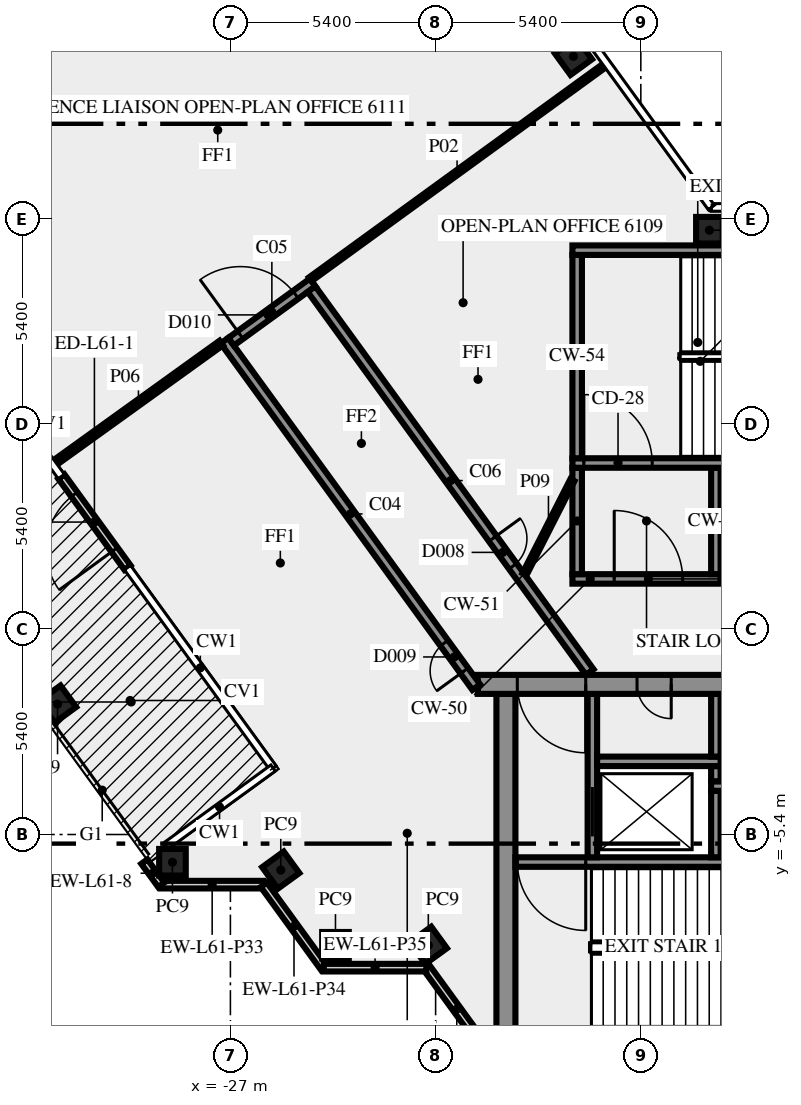
"""IFC4 building model, lengths in metres.
Left out: names, types, materials, properties, quantities, classifications, styles, units other than length and angle.
Written with IfcOpenShell. Run it as: python <this file> out.ifc"""

import sys

from ifc_helpers import new_model, si_unit, direction, frame, frame_2d, origin, origin_2d, place, context, subcontext, project, spatial, rectangle, extrude, element, fill, save


model = new_model("IFC4")
c1 = context("Model", 3, precision=1e-05, world=origin(), true_north=direction((0.0, 1.0)))
c2 = subcontext(c1, "Body", "Model", "MODEL_VIEW")
j1 = project(units=[si_unit("LENGTHUNIT", "METRE"), si_unit("PLANEANGLEUNIT", "RADIAN")], contexts=[c1])
p1 = place(None, origin())
s1 = spatial("IfcSite", under=j1, at=p1, CompositionType="ELEMENT")
p2 = place(p1, origin())
s2 = spatial("IfcBuilding", under=s1, at=p2, CompositionType="ELEMENT")
p3 = place(p2, frame((0.0, 0.0, 261.0)))
s3 = spatial("IfcBuildingStorey", under=s2, at=p3, CompositionType="ELEMENT", Elevation=261.0)
for number, where, z_axis, x_axis in (
    (1, (-17.974, 15.075, 0.0), (0.0, 0.0, 1.0), (-0.588, 0.809, 0.0)),
    (2, (-31.548, -1.969, 0.0), (0.0, 0.0, 1.0), (0.588, -0.809, 0.0)),
    (3, (-28.525, -6.13, 0.0), (0.0, 0.0, 1.0), (1.0, 0.0, 0.0)),
    (4, (-25.674, -6.337, 0.0), (0.0, 0.0, 1.0), (0.588, -0.809, 0.0)),
    (5, (-24.235, -8.315, 0.0), (0.0, 0.0, 1.0), (1.0, 0.0, 0.0)),
    (6, (-21.792, -8.315, 0.0), (0.0, 0.0, 1.0), (0.588, -0.809, 0.0)),
    (7, (-14.395, 10.5, 0.0), (0.0, 0.0, 1.0), (-1.0, 0.0, 0.0)),
):
    element("IfcColumn", number, at=place(p3, frame(where, z_axis=z_axis, x_axis=x_axis)), inside=s3, PredefinedType="COLUMN", context=c2, shape_type="SweptSolid", body=[
        extrude(rectangle(XDim=0.7, YDim=0.7, at=origin_2d()), origin(), (0.0, 0.0, 1.0), 3.65),
    ])
p4 = place(p3, frame((-21.833, -8.909, 0.0), z_axis=(0.0, 0.0, 1.0), x_axis=(0.587766567315, -0.809030569476, 0.0)))
e8 = element("IfcWall", 8, at=p4, inside=s3, PredefinedType="SOLIDWALL", context=c2, shape_type="SweptSolid", body=[
    extrude(rectangle(XDim=2.688, YDim=0.2, at=frame_2d((1.344, 0.0))), origin(), (0.0, 0.0, 1.0), 3.65),
])
p5 = place(p3, frame((-28.83, -6.719, 0.0), z_axis=(0.0, 0.0, 1.0), x_axis=(1.0, 0.0, 0.0)))
e9 = element("IfcWall", 9, at=p5, inside=s3, PredefinedType="SOLIDWALL", context=c2, shape_type="SweptSolid", body=[
    extrude(rectangle(XDim=2.7, YDim=0.2, at=frame_2d((1.35, 0.0))), origin(), (0.0, 0.0, 1.0), 3.65),
])
p6 = place(p3, frame((-26.12, -6.724, 0.0), z_axis=(0.0, 0.0, 1.0), x_axis=(0.587720002413, -0.809064397168, 0.0)))
e10 = element("IfcWall", 10, at=p6, inside=s3, PredefinedType="SOLIDWALL", context=c2, shape_type="SweptSolid", body=[
    extrude(rectangle(XDim=2.7, YDim=0.2, at=frame_2d((1.35, 0.0))), origin(), (0.0, 0.0, 1.0), 3.65),
])
p7 = place(p3, frame((-24.543, -8.904, 0.0), z_axis=(0.0, 0.0, 1.0), x_axis=(1.0, 0.0, 0.0)))
e11 = element("IfcWall", 11, at=p7, inside=s3, PredefinedType="SOLIDWALL", context=c2, shape_type="SweptSolid", body=[
    extrude(rectangle(XDim=2.7, YDim=0.2, at=frame_2d((1.35, 0.0))), origin(), (0.0, 0.0, 1.0), 3.65),
])
p8 = place(p3, frame((-29.708, 1.622, 0.0), z_axis=(0.0, 0.0, 1.0), x_axis=(-0.58782869016, 0.808985433135, 0.0)))
e12 = element("IfcWall", 12, at=p8, inside=s3, PredefinedType="SOLIDWALL", context=c2, shape_type="SweptSolid", body=[
    extrude(rectangle(XDim=2.963, YDim=0.2, at=frame_2d((1.481, 0.0))), origin(), (0.0, 0.0, 1.0), 3.65),
])
p9 = place(p8, frame((0.582, 0.0, 0.0)))
e13 = element("IfcOpeningElement", 13, at=p9, cuts=e12, PredefinedType="OPENING", context=c2, shape_type="SweptSolid", body=[
    extrude(rectangle(XDim=1.8, YDim=2.4, at=frame_2d((0.9, 1.2))), frame((0.0, 0.11, 0.0), z_axis=(0.0, -1.0, 0.0), x_axis=(1.0, 0.0, 0.0)), (0.0, 0.0, 1.0), 0.22),
])
p10 = place(p3, frame((-29.264, -6.113, 0.0), z_axis=(0.0, 0.0, 1.0), x_axis=(0.587941177097, -0.808903685412, 0.0)))
e14 = element("IfcWall", 14, at=p10, inside=s3, PredefinedType="SOLIDWALL", context=c2, shape_type="SweptSolid", body=[
    extrude(rectangle(XDim=0.756, YDim=0.2, at=frame_2d((0.378, 0.0))), origin(), (0.0, 0.0, 1.0), 3.65),
])
p11 = place(p3, frame((-19.75, -10.5, 0.0), z_axis=(0.0, 0.0, 1.0), x_axis=(0.0, 1.0, 0.0)))
e15 = element("IfcWall", 15, at=p11, inside=s3, PredefinedType="SHEAR", context=c2, shape_type="SweptSolid", body=[
    extrude(rectangle(XDim=8.8, YDim=0.5, at=frame_2d((4.4, 0.0))), origin(), (0.0, 0.0, 1.0), 3.65),
])
p12 = place(p3, frame((-11.45, -6.125, 0.0), z_axis=(0.0, 0.0, 1.0), x_axis=(-1.0, 0.0, 0.0)))
e16 = element("IfcWall", 16, at=p12, inside=s3, PredefinedType="SHEAR", context=c2, shape_type="SweptSolid", body=[
    extrude(rectangle(XDim=8.05, YDim=0.25, at=frame_2d((4.025, 0.0))), origin(), (0.0, 0.0, 1.0), 3.65),
])
p13 = place(p12, frame((6.2, 0.0, 0.0)))
e17 = element("IfcOpeningElement", 17, at=p13, cuts=e16, PredefinedType="OPENING", context=c2, shape_type="SweptSolid", body=[
    extrude(rectangle(XDim=1.8, YDim=2.1, at=frame_2d((0.9, 1.05))), frame((0.0, 0.135, 0.0), z_axis=(0.0, -1.0, 0.0), x_axis=(1.0, 0.0, 0.0)), (0.0, 0.0, 1.0), 0.27),
])
p14 = place(p3, frame((-17.475, -6.0, 0.0), z_axis=(0.0, 0.0, 1.0), x_axis=(0.0, 1.0, 0.0)))
e18 = element("IfcWall", 18, at=p14, inside=s3, PredefinedType="SHEAR", context=c2, shape_type="SweptSolid", body=[
    extrude(rectangle(XDim=4.3, YDim=0.25, at=frame_2d((2.15, 0.0))), origin(), (0.0, 0.0, 1.0), 3.65),
])
p15 = place(p14, frame((0.55, 0.0, 0.0)))
e19 = element("IfcOpeningElement", 19, at=p15, cuts=e18, PredefinedType="OPENING", context=c2, shape_type="SweptSolid", body=[
    extrude(rectangle(XDim=1.3, YDim=2.1, at=frame_2d((0.65, 1.05))), frame((0.0, 0.135, 0.0), z_axis=(0.0, -1.0, 0.0), x_axis=(1.0, 0.0, 0.0)), (0.0, 0.0, 1.0), 0.27),
])
p16 = place(p3, frame((-14.225, -6.0, 0.0), z_axis=(0.0, 0.0, 1.0), x_axis=(0.0, 1.0, 0.0)))
e20 = element("IfcWall", 20, at=p16, inside=s3, PredefinedType="SHEAR", context=c2, shape_type="SweptSolid", body=[
    extrude(rectangle(XDim=1.75, YDim=0.25, at=frame_2d((0.875, 0.0))), origin(), (0.0, 0.0, 1.0), 3.65),
])
p17 = place(p3, frame((-14.35, -4.125, 0.0), z_axis=(0.0, 0.0, 1.0), x_axis=(1.0, 0.0, 0.0)))
e21 = element("IfcWall", 21, at=p17, inside=s3, PredefinedType="SHEAR", context=c2, shape_type="SweptSolid", body=[
    extrude(rectangle(XDim=10.4, YDim=0.25, at=frame_2d((5.2, 0.0))), origin(), (0.0, 0.0, 1.0), 3.65),
])
p18 = place(p17, frame((4.75, 0.0, 0.0)))
e22 = element("IfcOpeningElement", 22, at=p18, cuts=e21, PredefinedType="OPENING", context=c2, shape_type="SweptSolid", body=[
    extrude(rectangle(XDim=1.1, YDim=2.1, at=frame_2d((0.55, 1.05))), frame((0.0, 0.135, 0.0), z_axis=(0.0, -1.0, 0.0), x_axis=(1.0, 0.0, 0.0)), (0.0, 0.0, 1.0), 0.27),
])
p19 = place(p17, frame((7.25, 0.0, 0.0)))
e23 = element("IfcOpeningElement", 23, at=p19, cuts=e21, PredefinedType="OPENING", context=c2, shape_type="SweptSolid", body=[
    extrude(rectangle(XDim=1.1, YDim=2.1, at=frame_2d((0.55, 1.05))), frame((0.0, 0.135, 0.0), z_axis=(0.0, -1.0, 0.0), x_axis=(1.0, 0.0, 0.0)), (0.0, 0.0, 1.0), 0.27),
])
p20 = place(p3, frame((-14.225, -4.0, 0.0), z_axis=(0.0, 0.0, 1.0), x_axis=(0.0, 1.0, 0.0)))
e24 = element("IfcWall", 24, at=p20, inside=s3, PredefinedType="SHEAR", context=c2, shape_type="SweptSolid", body=[
    extrude(rectangle(XDim=0.4, YDim=0.25, at=frame_2d((0.2, 0.0))), origin(), (0.0, 0.0, 1.0), 3.65),
])
p21 = place(p3, frame((-17.35, -3.475, 0.0), z_axis=(0.0, 0.0, 1.0), x_axis=(1.0, 0.0, 0.0)))
e25 = element("IfcWall", 25, at=p21, inside=s3, PredefinedType="SHEAR", context=c2, shape_type="SweptSolid", body=[
    extrude(rectangle(XDim=3.25, YDim=0.25, at=frame_2d((1.625, 0.0))), origin(), (0.0, 0.0, 1.0), 3.65),
])
p22 = place(p3, frame((-14.225, -3.35, 0.0), z_axis=(0.0, 0.0, 1.0), x_axis=(0.0, 1.0, 0.0)))
e26 = element("IfcWall", 26, at=p22, inside=s3, PredefinedType="SHEAR", context=c2, shape_type="SweptSolid", body=[
    extrude(rectangle(XDim=1.65, YDim=0.25, at=frame_2d((0.825, 0.0))), origin(), (0.0, 0.0, 1.0), 3.65),
])
p23 = place(p3, frame((20.49, -1.45, 0.0), z_axis=(0.0, 0.0, 1.0), x_axis=(-1.0, 0.0, 0.0)))
e27 = element("IfcWall", 27, at=p23, inside=s3, PredefinedType="SHEAR", context=c2, shape_type="SweptSolid", body=[
    extrude(rectangle(XDim=40.98, YDim=0.5, at=frame_2d((20.49, 0.0))), origin(), (0.0, 0.0, 1.0), 3.65),
])
p24 = place(p23, frame((38.14, 0.0, 0.0)))
e28 = element("IfcOpeningElement", 28, at=p24, cuts=e27, PredefinedType="OPENING", context=c2, shape_type="SweptSolid", body=[
    extrude(rectangle(XDim=1.8, YDim=2.1, at=frame_2d((0.9, 1.05))), frame((0.0, 0.26, 0.0), z_axis=(0.0, -1.0, 0.0), x_axis=(1.0, 0.0, 0.0)), (0.0, 0.0, 1.0), 0.52),
])
p25 = place(p23, frame((35.89, 0.0, 0.0)))
e29 = element("IfcOpeningElement", 29, at=p25, cuts=e27, PredefinedType="OPENING", context=c2, shape_type="SweptSolid", body=[
    extrude(rectangle(XDim=0.9, YDim=2.1, at=frame_2d((0.45, 1.05))), frame((0.0, 0.26, 0.0), z_axis=(0.0, -1.0, 0.0), x_axis=(1.0, 0.0, 0.0)), (0.0, 0.0, 1.0), 0.52),
])
p26 = place(p23, frame((32.94, 0.0, 0.0)))
e30 = element("IfcOpeningElement", 30, at=p26, cuts=e27, PredefinedType="OPENING", context=c2, shape_type="SweptSolid", body=[
    extrude(rectangle(XDim=0.9, YDim=2.1, at=frame_2d((0.45, 1.05))), frame((0.0, 0.26, 0.0), z_axis=(0.0, -1.0, 0.0), x_axis=(1.0, 0.0, 0.0)), (0.0, 0.0, 1.0), 0.52),
])
p27 = place(p23, frame((31.015, 0.0, 0.0)))
e31 = element("IfcOpeningElement", 31, at=p27, cuts=e27, PredefinedType="OPENING", context=c2, shape_type="SweptSolid", body=[
    extrude(rectangle(XDim=0.8, YDim=2.1, at=frame_2d((0.4, 1.05))), frame((0.0, 0.26, 0.0), z_axis=(0.0, -1.0, 0.0), x_axis=(1.0, 0.0, 0.0)), (0.0, 0.0, 1.0), 0.52),
])
p28 = place(p23, frame((24.765, 0.0, 0.0)))
e32 = element("IfcOpeningElement", 32, at=p28, cuts=e27, PredefinedType="OPENING", context=c2, shape_type="SweptSolid", body=[
    extrude(rectangle(XDim=0.8, YDim=2.1, at=frame_2d((0.4, 1.05))), frame((0.0, 0.26, 0.0), z_axis=(0.0, -1.0, 0.0), x_axis=(1.0, 0.0, 0.0)), (0.0, 0.0, 1.0), 0.52),
])
p29 = place(p23, frame((21.765, 0.0, 0.0)))
e33 = element("IfcOpeningElement", 33, at=p29, cuts=e27, PredefinedType="OPENING", context=c2, shape_type="SweptSolid", body=[
    extrude(rectangle(XDim=2.0, YDim=2.1, at=frame_2d((1.0, 1.05))), frame((0.0, 0.26, 0.0), z_axis=(0.0, -1.0, 0.0), x_axis=(1.0, 0.0, 0.0)), (0.0, 0.0, 1.0), 0.52),
])
p30 = place(p23, frame((14.202, 0.0, 0.0)))
e34 = element("IfcOpeningElement", 34, at=p30, cuts=e27, PredefinedType="OPENING", context=c2, shape_type="SweptSolid", body=[
    extrude(rectangle(XDim=0.9, YDim=2.1, at=frame_2d((0.45, 1.05))), frame((0.0, 0.26, 0.0), z_axis=(0.0, -1.0, 0.0), x_axis=(1.0, 0.0, 0.0)), (0.0, 0.0, 1.0), 0.52),
])
p31 = place(p23, frame((10.478, 0.0, 0.0)))
e35 = element("IfcOpeningElement", 35, at=p31, cuts=e27, PredefinedType="OPENING", context=c2, shape_type="SweptSolid", body=[
    extrude(rectangle(XDim=0.9, YDim=2.1, at=frame_2d((0.45, 1.05))), frame((0.0, 0.26, 0.0), z_axis=(0.0, -1.0, 0.0), x_axis=(1.0, 0.0, 0.0)), (0.0, 0.0, 1.0), 0.52),
])
p32 = place(p23, frame((7.14, 0.0, 0.0)))
e36 = element("IfcOpeningElement", 36, at=p32, cuts=e27, PredefinedType="OPENING", context=c2, shape_type="SweptSolid", body=[
    extrude(rectangle(XDim=0.9, YDim=2.1, at=frame_2d((0.45, 1.05))), frame((0.0, 0.26, 0.0), z_axis=(0.0, -1.0, 0.0), x_axis=(1.0, 0.0, 0.0)), (0.0, 0.0, 1.0), 0.52),
])
p33 = place(p23, frame((5.028, 0.0, 0.0)))
e37 = element("IfcOpeningElement", 37, at=p33, cuts=e27, PredefinedType="OPENING", context=c2, shape_type="SweptSolid", body=[
    extrude(rectangle(XDim=0.8, YDim=2.1, at=frame_2d((0.4, 1.05))), frame((0.0, 0.26, 0.0), z_axis=(0.0, -1.0, 0.0), x_axis=(1.0, 0.0, 0.0)), (0.0, 0.0, 1.0), 0.52),
])
p34 = place(p23, frame((3.452, 0.0, 0.0)))
e38 = element("IfcOpeningElement", 38, at=p34, cuts=e27, PredefinedType="OPENING", context=c2, shape_type="SweptSolid", body=[
    extrude(rectangle(XDim=0.8, YDim=2.1, at=frame_2d((0.4, 1.05))), frame((0.0, 0.26, 0.0), z_axis=(0.0, -1.0, 0.0), x_axis=(1.0, 0.0, 0.0)), (0.0, 0.0, 1.0), 0.52),
])
p35 = place(p23, frame((1.04, 0.0, 0.0)))
e39 = element("IfcOpeningElement", 39, at=p35, cuts=e27, PredefinedType="OPENING", context=c2, shape_type="SweptSolid", body=[
    extrude(rectangle(XDim=1.8, YDim=2.1, at=frame_2d((0.9, 1.05))), frame((0.0, 0.26, 0.0), z_axis=(0.0, -1.0, 0.0), x_axis=(1.0, 0.0, 0.0)), (0.0, 0.0, 1.0), 0.52),
])
p36 = place(p3, frame((-18.0, 1.325, 0.0), z_axis=(0.0, 0.0, 1.0), x_axis=(1.0, 0.0, 0.0)))
e40 = element("IfcWall", 40, at=p36, inside=s3, PredefinedType="SHEAR", context=c2, shape_type="SweptSolid", body=[
    extrude(rectangle(XDim=3.9, YDim=0.25, at=frame_2d((1.95, 0.0))), origin(), (0.0, 0.0, 1.0), 3.65),
])
p37 = place(p36, frame((1.1, 0.0, 0.0)))
e41 = element("IfcOpeningElement", 41, at=p37, cuts=e40, PredefinedType="OPENING", context=c2, shape_type="SweptSolid", body=[
    extrude(rectangle(XDim=1.8, YDim=2.1, at=frame_2d((0.9, 1.05))), frame((0.0, 0.135, 0.0), z_axis=(0.0, -1.0, 0.0), x_axis=(1.0, 0.0, 0.0)), (0.0, 0.0, 1.0), 0.27),
])
for number, where, z_axis, x_axis in (
    (42, (-17.875, 1.45, 0.0), (0.0, 0.0, 1.0), (0.0, 1.0, 0.0)),
    (43, (-14.225, 1.45, 0.0), (0.0, 0.0, 1.0), (0.0, 1.0, 0.0)),
):
    element("IfcWall", number, at=place(p3, frame(where, z_axis=z_axis, x_axis=x_axis)), inside=s3, PredefinedType="SHEAR", context=c2, shape_type="SweptSolid", body=[
        extrude(rectangle(XDim=2.8, YDim=0.25, at=frame_2d((1.4, 0.0))), origin(), (0.0, 0.0, 1.0), 3.65),
    ])
p38 = place(p3, frame((-18.0, 4.375, 0.0), z_axis=(0.0, 0.0, 1.0), x_axis=(1.0, 0.0, 0.0)))
e44 = element("IfcWall", 44, at=p38, inside=s3, PredefinedType="SHEAR", context=c2, shape_type="SweptSolid", body=[
    extrude(rectangle(XDim=10.5, YDim=0.25, at=frame_2d((5.25, 0.0))), origin(), (0.0, 0.0, 1.0), 3.65),
])
p39 = place(p38, frame((0.3, 0.0, 0.0)))
e45 = element("IfcOpeningElement", 45, at=p39, cuts=e44, PredefinedType="OPENING", context=c2, shape_type="SweptSolid", body=[
    extrude(rectangle(XDim=1.8, YDim=2.1, at=frame_2d((0.9, 1.05))), frame((0.0, 0.135, 0.0), z_axis=(0.0, -1.0, 0.0), x_axis=(1.0, 0.0, 0.0)), (0.0, 0.0, 1.0), 0.27),
])
p40 = place(p3, frame((-17.875, 4.5, 0.0), z_axis=(0.0, 0.0, 1.0), x_axis=(0.0, 1.0, 0.0)))
e46 = element("IfcWall", 46, at=p40, inside=s3, PredefinedType="SHEAR", context=c2, shape_type="SweptSolid", body=[
    extrude(rectangle(XDim=5.35, YDim=0.25, at=frame_2d((2.675, 0.0))), origin(), (0.0, 0.0, 1.0), 3.65),
])
p41 = place(p3, frame((-18.0, 9.975, 0.0), z_axis=(0.0, 0.0, 1.0), x_axis=(1.0, 0.0, 0.0)))
e47 = element("IfcWall", 47, at=p41, inside=s3, PredefinedType="SHEAR", context=c2, shape_type="SweptSolid", body=[
    extrude(rectangle(XDim=10.5, YDim=0.25, at=frame_2d((5.25, 0.0))), origin(), (0.0, 0.0, 1.0), 3.65),
])
p42 = place(p41, frame((4.5, 0.0, 1.0)))
e48 = element("IfcOpeningElement", 48, at=p42, cuts=e47, PredefinedType="OPENING", context=c2, shape_type="SweptSolid", body=[
    extrude(rectangle(XDim=1.2, YDim=1.2, at=frame_2d((0.6, 0.6))), frame((0.0, 0.135, 0.0), z_axis=(0.0, -1.0, 0.0), x_axis=(1.0, 0.0, 0.0)), (0.0, 0.0, 1.0), 0.27),
])
p43 = place(p3, frame((-20.531, -1.523, 0.0), z_axis=(0.0, 0.0, 1.0), x_axis=(-0.587782646447, 0.809018887626, 0.0)))
e49 = element("IfcWall", 49, at=p43, inside=s3, PredefinedType="SOLIDWALL", context=c2, shape_type="SweptSolid", body=[
    extrude(rectangle(XDim=11.27, YDim=0.25, at=frame_2d((5.635, 0.0))), origin(), (0.0, 0.0, 1.0), 3.65),
])
p44 = place(p43, frame((0.533, 0.0, 0.0)))
e50 = element("IfcOpeningElement", 50, at=p44, cuts=e49, PredefinedType="OPENING", context=c2, shape_type="SweptSolid", body=[
    extrude(rectangle(XDim=0.9, YDim=2.1, at=frame_2d((0.45, 1.05))), frame((0.0, 0.135, 0.0), z_axis=(0.0, -1.0, 0.0), x_axis=(1.0, 0.0, 0.0)), (0.0, 0.0, 1.0), 0.27),
])
p45 = place(p3, frame((-26.981, 7.567, 0.0), z_axis=(0.0, 0.0, 1.0), x_axis=(0.809038743598, 0.587755315891, 0.0)))
e51 = element("IfcWall", 51, at=p45, inside=s3, PredefinedType="SOLIDWALL", context=c2, shape_type="SweptSolid", body=[
    extrude(rectangle(XDim=2.65, YDim=0.25, at=frame_2d((1.325, 0.0))), origin(), (0.0, 0.0, 1.0), 3.65),
])
p46 = place(p45, frame((0.3, 0.0, 0.0)))
e52 = element("IfcOpeningElement", 52, at=p46, cuts=e51, PredefinedType="OPENING", context=c2, shape_type="SweptSolid", body=[
    extrude(rectangle(XDim=1.8, YDim=2.1, at=frame_2d((0.9, 1.05))), frame((0.0, 0.135, 0.0), z_axis=(0.0, -1.0, 0.0), x_axis=(1.0, 0.0, 0.0)), (0.0, 0.0, 1.0), 0.27),
])
p47 = place(p3, frame((-24.865, 8.95, 0.0), z_axis=(0.0, 0.0, 1.0), x_axis=(0.587791617212, -0.809012369952, 0.0)))
e53 = element("IfcWall", 53, at=p47, inside=s3, PredefinedType="SOLIDWALL", context=c2, shape_type="SweptSolid", body=[
    extrude(rectangle(XDim=12.453, YDim=0.25, at=frame_2d((6.227, 0.0))), origin(), (0.0, 0.0, 1.0), 3.65),
])
p48 = place(p47, frame((8.112, 0.0, 0.0)))
e54 = element("IfcOpeningElement", 54, at=p48, cuts=e53, PredefinedType="OPENING", context=c2, shape_type="SweptSolid", body=[
    extrude(rectangle(XDim=0.9, YDim=2.1, at=frame_2d((0.45, 1.05))), frame((0.0, 0.135, 0.0), z_axis=(0.0, -1.0, 0.0), x_axis=(1.0, 0.0, 0.0)), (0.0, 0.0, 1.0), 0.27),
])
p49 = place(p3, frame((-17.172, 14.823, 0.0), z_axis=(0.0, 0.0, 1.0), x_axis=(-0.809034479891, -0.587761184791, 0.0)))
e55 = element("IfcWall", 55, at=p49, inside=s3, PredefinedType="PARTITIONING", context=c2, shape_type="SweptSolid", body=[
    extrude(rectangle(XDim=9.55, YDim=0.12, at=frame_2d((4.775, 0.0))), origin(), (0.0, 0.0, 1.0), 2.95),
])
p50 = place(p3, frame((-31.6, 4.397, 0.0), z_axis=(0.0, 0.0, 1.0), x_axis=(0.811784350662, 0.583957334075, 0.0)))
e56 = element("IfcWall", 56, at=p50, inside=s3, PredefinedType="PARTITIONING", context=c2, shape_type="SweptSolid", body=[
    extrude(rectangle(XDim=5.37, YDim=0.15, at=frame_2d((2.685, 0.0))), origin(), (0.0, 0.0, 1.0), 3.65),
])
p51 = place(p3, frame((-19.261, 1.45, 0.0), z_axis=(0.0, 0.0, 1.0), x_axis=(0.453950796792, 0.891026752736, 0.0)))
e57 = element("IfcWall", 57, at=p51, inside=s3, PredefinedType="PARTITIONING", context=c2, shape_type="SweptSolid", body=[
    extrude(rectangle(XDim=2.778, YDim=0.12, at=frame_2d((1.389, 0.0))), origin(), (0.0, 0.0, 1.0), 3.65),
])
p52 = place(p9, origin())
e58 = element("IfcDoor", 58, at=p52, inside=s3, OperationType="DOUBLE_DOOR_SINGLE_SWING", PredefinedType="DOOR", context=c2, shape_type="SweptSolid", body=[
    extrude(rectangle(XDim=1.8, YDim=2.4, at=frame_2d((0.9, 1.2))), frame((0.0, 0.025, 0.0), z_axis=(0.0, -1.0, 0.0), x_axis=(1.0, 0.0, 0.0)), (0.0, 0.0, 1.0), 0.05),
])
fill(e13, e58)
p53 = place(p13, origin())
e59 = element("IfcDoor", 59, at=p53, inside=s3, OperationType="DOUBLE_DOOR_SINGLE_SWING", PredefinedType="DOOR", context=c2, shape_type="SweptSolid", body=[
    extrude(rectangle(XDim=1.8, YDim=2.1, at=frame_2d((0.9, 1.05))), frame((0.0, 0.025, 0.0), z_axis=(0.0, -1.0, 0.0), x_axis=(1.0, 0.0, 0.0)), (0.0, 0.0, 1.0), 0.05),
])
fill(e17, e59)
p54 = place(p15, origin())
e60 = element("IfcDoor", 60, at=p54, inside=s3, OperationType="DOUBLE_DOOR_SLIDING", PredefinedType="DOOR", context=c2, shape_type="SweptSolid", body=[
    extrude(rectangle(XDim=1.3, YDim=2.1, at=frame_2d((0.65, 1.05))), frame((0.0, 0.025, 0.0), z_axis=(0.0, -1.0, 0.0), x_axis=(1.0, 0.0, 0.0)), (0.0, 0.0, 1.0), 0.05),
])
fill(e19, e60)
p55 = place(p24, origin())
e61 = element("IfcDoor", 61, at=p55, inside=s3, OperationType="DOUBLE_DOOR_SINGLE_SWING", PredefinedType="DOOR", context=c2, shape_type="SweptSolid", body=[
    extrude(rectangle(XDim=1.8, YDim=2.1, at=frame_2d((0.9, 1.05))), frame((0.0, 0.025, 0.0), z_axis=(0.0, -1.0, 0.0), x_axis=(1.0, 0.0, 0.0)), (0.0, 0.0, 1.0), 0.05),
])
fill(e28, e61)
p56 = place(p25, origin())
e62 = element("IfcDoor", 62, at=p56, inside=s3, OperationType="SINGLE_SWING_RIGHT", PredefinedType="DOOR", context=c2, shape_type="SweptSolid", body=[
    extrude(rectangle(XDim=0.9, YDim=2.1, at=frame_2d((0.45, 1.05))), frame((0.0, 0.025, 0.0), z_axis=(0.0, -1.0, 0.0), x_axis=(1.0, 0.0, 0.0)), (0.0, 0.0, 1.0), 0.05),
])
fill(e29, e62)
p57 = place(p37, origin())
e63 = element("IfcDoor", 63, at=p57, inside=s3, OperationType="DOUBLE_DOOR_SINGLE_SWING", PredefinedType="DOOR", context=c2, shape_type="SweptSolid", body=[
    extrude(rectangle(XDim=1.8, YDim=2.1, at=frame_2d((0.9, 1.05))), frame((0.0, 0.025, 0.0), z_axis=(0.0, -1.0, 0.0), x_axis=(1.0, 0.0, 0.0)), (0.0, 0.0, 1.0), 0.05),
])
fill(e41, e63)
p58 = place(p39, origin())
e64 = element("IfcDoor", 64, at=p58, inside=s3, OperationType="DOUBLE_DOOR_SINGLE_SWING", PredefinedType="DOOR", context=c2, shape_type="SweptSolid", body=[
    extrude(rectangle(XDim=1.8, YDim=2.1, at=frame_2d((0.9, 1.05))), frame((0.0, 0.025, 0.0), z_axis=(0.0, -1.0, 0.0), x_axis=(1.0, 0.0, 0.0)), (0.0, 0.0, 1.0), 0.05),
])
fill(e45, e64)
p59 = place(p48, origin())
e65 = element("IfcDoor", 65, at=p59, inside=s3, OperationType="SINGLE_SWING_RIGHT", PredefinedType="DOOR", context=c2, shape_type="SweptSolid", body=[
    extrude(rectangle(XDim=0.9, YDim=2.1, at=frame_2d((0.45, 1.05))), frame((0.0, 0.025, 0.0), z_axis=(0.0, -1.0, 0.0), x_axis=(1.0, 0.0, 0.0)), (0.0, 0.0, 1.0), 0.05),
])
fill(e54, e65)
p60 = place(p46, origin())
e66 = element("IfcDoor", 66, at=p60, inside=s3, OperationType="DOUBLE_DOOR_SINGLE_SWING", PredefinedType="DOOR", context=c2, shape_type="SweptSolid", body=[
    extrude(rectangle(XDim=1.8, YDim=2.1, at=frame_2d((0.9, 1.05))), frame((0.0, 0.025, 0.0), z_axis=(0.0, -1.0, 0.0), x_axis=(1.0, 0.0, 0.0)), (0.0, 0.0, 1.0), 0.05),
])
fill(e52, e66)
p61 = place(p44, origin())
e67 = element("IfcDoor", 67, at=p61, inside=s3, OperationType="SINGLE_SWING_LEFT", PredefinedType="DOOR", context=c2, shape_type="SweptSolid", body=[
    extrude(rectangle(XDim=0.9, YDim=2.1, at=frame_2d((0.45, 1.05))), frame((0.0, 0.025, 0.0), z_axis=(0.0, -1.0, 0.0), x_axis=(1.0, 0.0, 0.0)), (0.0, 0.0, 1.0), 0.05),
])
fill(e50, e67)
save(model, sys.argv[1])
